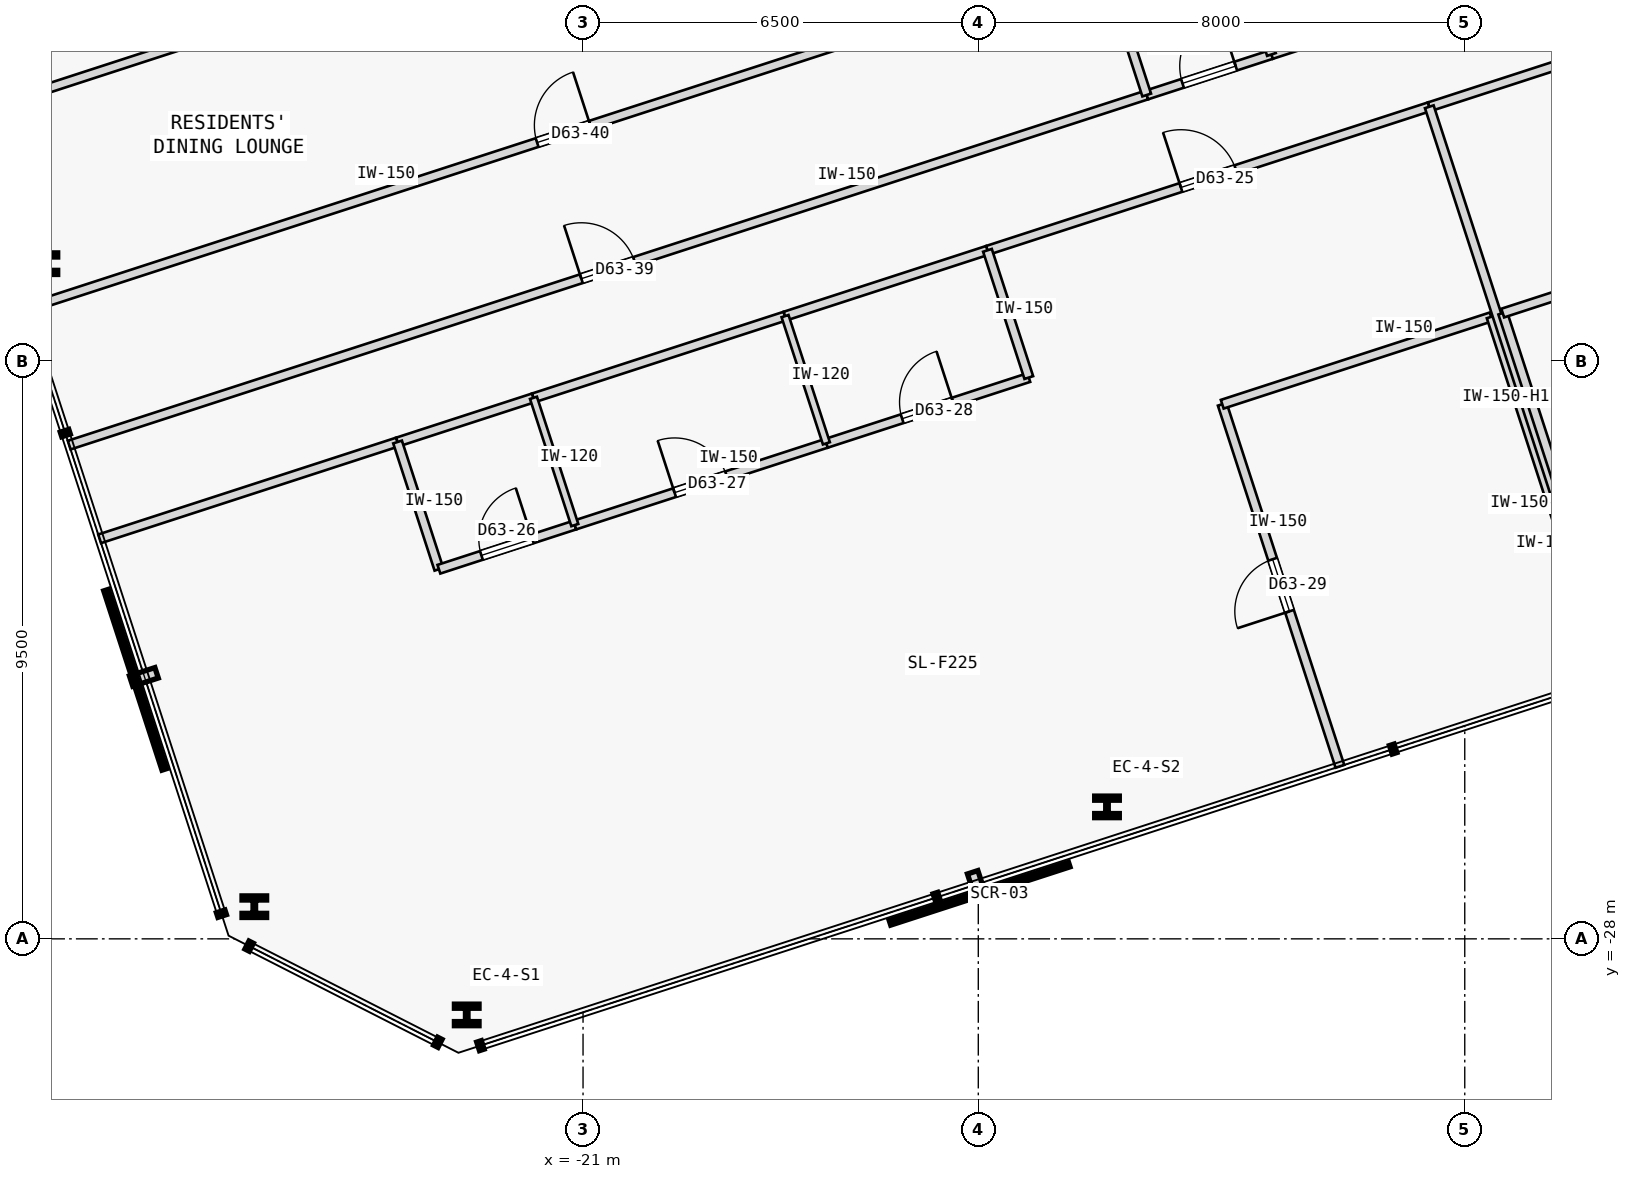
"""IFC4 building model, lengths in metres.
Left out: names, types, materials, properties, quantities, classifications, styles, units other than length and angle.
Written with IfcOpenShell. Run it as: python <this file> out.ifc"""

import sys

from ifc_helpers import new_model, si_unit, direction, frame, frame_2d, origin, origin_2d, place, context, subcontext, project, spatial, rectangle, i_section, extrude, element, fill, save


model = new_model("IFC4")
c1 = context("Model", 3, precision=1e-05, world=origin(), true_north=direction((0.0, 1.0)))
c2 = subcontext(c1, "Body", "Model", "MODEL_VIEW")
j1 = project(units=[si_unit("LENGTHUNIT", "METRE"), si_unit("PLANEANGLEUNIT", "RADIAN")], contexts=[c1])
p1 = place(None, origin())
s1 = spatial("IfcSite", under=j1, at=p1, CompositionType="ELEMENT")
p2 = place(p1, origin())
s2 = spatial("IfcBuilding", under=s1, at=p2, CompositionType="ELEMENT")
p3 = place(p2, frame((0.0, 0.0, 237.7)))
s3 = spatial("IfcBuildingStorey", under=s2, at=p3, CompositionType="ELEMENT", Elevation=237.7)
for number, where, z_axis, x_axis in (
    (1, (-22.913, -29.251, 0.0), (0.0, 0.0, 1.0), (1.0, 0.0, 0.0)),
    (2, (-12.384, -25.83, 0.0), (0.0, 0.0, 1.0), (1.0, 0.0, 0.0)),
    (3, (-29.842, -16.897, 0.0), (0.0, 0.0, 1.0), (1.0, 0.0, 0.0)),
    (4, (-26.406, -27.471, 0.0), (0.0, 0.0, 1.0), (1.0, 0.0, 0.0)),
):
    element("IfcColumn", number, at=place(p3, frame(where, z_axis=z_axis, x_axis=x_axis)), inside=s3, PredefinedType="COLUMN", context=c2, shape_type="SweptSolid", body=[
        extrude(i_section(OverallWidth=0.405, OverallDepth=0.355, WebThickness=0.042, FlangeThickness=0.068, FilletRadius=0.015, at=origin_2d()), origin(), (0.0, 0.0, 1.0), 3.35),
    ])
p4 = place(p3, frame((-28.95, -21.421, 0.0), z_axis=(0.0, 0.0, 1.0), x_axis=(0.951058442388, 0.309011066408, 0.0)))
e5 = element("IfcWall", 5, at=p4, inside=s3, PredefinedType="PARTITIONING", context=c2, shape_type="SweptSolid", body=[
    extrude(rectangle(XDim=5.152, YDim=0.15, at=frame_2d((2.576, 0.0))), origin(), (0.0, 0.0, 1.0), 3.125),
])
p5 = place(p3, frame((-14.349, -16.677, 0.0), z_axis=(0.0, 0.0, 1.0), x_axis=(0.951058958043, 0.309009479345, 0.0)))
e6 = element("IfcWall", 6, at=p5, inside=s3, PredefinedType="PARTITIONING", context=c2, shape_type="SweptSolid", body=[
    extrude(rectangle(XDim=7.64, YDim=0.15, at=frame_2d((3.82, 0.0))), origin(), (0.0, 0.0, 1.0), 3.125),
])
p6 = place(p5, frame((3.345, 0.0, 0.0)))
e7 = element("IfcOpeningElement", 7, at=p6, cuts=e6, PredefinedType="OPENING", context=c2, shape_type="SweptSolid", body=[
    extrude(rectangle(XDim=0.95, YDim=2.15, at=frame_2d((0.475, 1.075))), frame((0.0, 0.085, 0.0), z_axis=(0.0, -1.0, 0.0), x_axis=(1.0, 0.0, 0.0)), (0.0, 0.0, 1.0), 0.17),
])
p7 = place(p3, frame((-24.05, -19.829, 0.0), z_axis=(0.0, 0.0, 1.0), x_axis=(0.951035595692, 0.309081373955, 0.0)))
e8 = element("IfcWall", 8, at=p7, inside=s3, PredefinedType="PARTITIONING", context=c2, shape_type="SweptSolid", body=[
    extrude(rectangle(XDim=2.35, YDim=0.15, at=frame_2d((1.175, 0.0))), origin(), (0.0, 0.0, 1.0), 3.125),
])
p8 = place(p3, frame((-21.815, -19.103, 0.0), z_axis=(0.0, 0.0, 1.0), x_axis=(0.951057987102, 0.309012467661, 0.0)))
e9 = element("IfcWall", 9, at=p8, inside=s3, PredefinedType="PARTITIONING", context=c2, shape_type="SweptSolid", body=[
    extrude(rectangle(XDim=4.35, YDim=0.15, at=frame_2d((2.175, 0.0))), origin(), (0.0, 0.0, 1.0), 3.125),
])
p9 = place(p3, frame((-17.678, -17.759, 0.0), z_axis=(0.0, 0.0, 1.0), x_axis=(0.951055596592, 0.309019824916, 0.0)))
e10 = element("IfcWall", 10, at=p9, inside=s3, PredefinedType="PARTITIONING", context=c2, shape_type="SweptSolid", body=[
    extrude(rectangle(XDim=3.5, YDim=0.15, at=frame_2d((1.75, 0.0))), origin(), (0.0, 0.0, 1.0), 3.125),
])
p10 = place(p3, frame((-7.083, -14.316, 0.0), z_axis=(0.0, 0.0, 1.0), x_axis=(0.951054265246, 0.309023922305, 0.0)))
e11 = element("IfcWall", 11, at=p10, inside=s3, PredefinedType="PARTITIONING", context=c2, shape_type="SweptSolid", body=[
    extrude(rectangle(XDim=4.53, YDim=0.15, at=frame_2d((2.265, 0.0))), origin(), (0.0, 0.0, 1.0), 3.125),
])
p11 = place(p3, frame((-29.45, -19.881, 0.0), z_axis=(0.0, 0.0, 1.0), x_axis=(0.95105650271, 0.309017036186, 0.0)))
e12 = element("IfcWall", 12, at=p11, inside=s3, PredefinedType="PARTITIONING", context=c2, shape_type="SweptSolid", body=[
    extrude(rectangle(XDim=18.632, YDim=0.15, at=frame_2d((9.316, 0.0))), origin(), (0.0, 0.0, 1.0), 3.125),
])
p12 = place(p11, frame((8.856, 0.0, 0.0)))
e13 = element("IfcOpeningElement", 13, at=p12, cuts=e12, PredefinedType="OPENING", context=c2, shape_type="SweptSolid", body=[
    extrude(rectangle(XDim=0.92, YDim=2.15, at=frame_2d((0.46, 1.075))), frame((0.0, 0.085, 0.0), z_axis=(0.0, -1.0, 0.0), x_axis=(1.0, 0.0, 0.0)), (0.0, 0.0, 1.0), 0.17),
])
p13 = place(p3, frame((-11.73, -14.123, 0.0), z_axis=(0.0, 0.0, 1.0), x_axis=(0.951066501686, 0.308986260812, 0.0)))
e14 = element("IfcWall", 14, at=p13, inside=s3, PredefinedType="PARTITIONING", context=c2, shape_type="SweptSolid", body=[
    extrude(rectangle(XDim=2.157, YDim=0.15, at=frame_2d((1.079, 0.0))), origin(), (0.0, 0.0, 1.0), 3.125),
])
p14 = place(p13, frame((0.618, 0.0, 0.0)))
e15 = element("IfcOpeningElement", 15, at=p14, cuts=e14, PredefinedType="OPENING", context=c2, shape_type="SweptSolid", body=[
    extrude(rectangle(XDim=0.92, YDim=2.15, at=frame_2d((0.46, 1.075))), frame((0.0, 0.085, 0.0), z_axis=(0.0, -1.0, 0.0), x_axis=(1.0, 0.0, 0.0)), (0.0, 0.0, 1.0), 0.17),
])
p15 = place(p3, frame((-9.679, -13.457, 0.0), z_axis=(0.0, 0.0, 1.0), x_axis=(0.951054104561, 0.309024416831, 0.0)))
e16 = element("IfcWall", 16, at=p15, inside=s3, PredefinedType="PARTITIONING", context=c2, shape_type="SweptSolid", body=[
    extrude(rectangle(XDim=3.492, YDim=0.15, at=frame_2d((1.746, 0.0))), origin(), (0.0, 0.0, 1.0), 3.125),
])
p16 = place(p15, frame((1.286, 0.0, 0.0)))
e17 = element("IfcOpeningElement", 17, at=p16, cuts=e16, PredefinedType="OPENING", context=c2, shape_type="SweptSolid", body=[
    extrude(rectangle(XDim=0.92, YDim=2.15, at=frame_2d((0.46, 1.075))), frame((0.0, 0.085, 0.0), z_axis=(0.0, -1.0, 0.0), x_axis=(1.0, 0.0, 0.0)), (0.0, 0.0, 1.0), 0.17),
])
p17 = place(p3, frame((-23.37, -21.922, 0.0), z_axis=(0.0, 0.0, 1.0), x_axis=(-0.308960600764, 0.951074837842, 0.0)))
e18 = element("IfcWall", 18, at=p17, inside=s3, PredefinedType="PARTITIONING", context=c2, shape_type="SweptSolid", body=[
    extrude(rectangle(XDim=2.2, YDim=0.15, at=frame_2d((1.1, 0.0))), origin(), (0.0, 0.0, 1.0), 3.125),
])
p18 = place(p3, frame((-23.37, -21.922, 0.0), z_axis=(0.0, 0.0, 1.0), x_axis=(0.951045519245, 0.309050837767, 0.0)))
e19 = element("IfcWall", 19, at=p18, inside=s3, PredefinedType="PARTITIONING", context=c2, shape_type="SweptSolid", body=[
    extrude(rectangle(XDim=2.35, YDim=0.15, at=frame_2d((1.175, 0.0))), origin(), (0.0, 0.0, 1.0), 3.125),
])
p19 = place(p18, frame((0.735, 0.0, 0.0)))
e20 = element("IfcOpeningElement", 20, at=p19, cuts=e19, PredefinedType="OPENING", context=c2, shape_type="SweptSolid", body=[
    extrude(rectangle(XDim=0.88, YDim=2.15, at=frame_2d((0.44, 1.075))), frame((0.0, 0.085, 0.0), z_axis=(0.0, -1.0, 0.0), x_axis=(1.0, 0.0, 0.0)), (0.0, 0.0, 1.0), 0.17),
])
p20 = place(p3, frame((-21.135, -21.195, 0.0), z_axis=(0.0, 0.0, 1.0), x_axis=(0.951069122051, 0.308978195154, 0.0)))
e21 = element("IfcWall", 21, at=p20, inside=s3, PredefinedType="PARTITIONING", context=c2, shape_type="SweptSolid", body=[
    extrude(rectangle(XDim=4.35, YDim=0.15, at=frame_2d((2.175, 0.0))), origin(), (0.0, 0.0, 1.0), 3.125),
])
p21 = place(p20, frame((1.725, 0.0, 0.0)))
e22 = element("IfcOpeningElement", 22, at=p21, cuts=e21, PredefinedType="OPENING", context=c2, shape_type="SweptSolid", body=[
    extrude(rectangle(XDim=0.9, YDim=2.15, at=frame_2d((0.45, 1.075))), frame((0.0, 0.085, 0.0), z_axis=(0.0, -1.0, 0.0), x_axis=(1.0, 0.0, 0.0)), (0.0, 0.0, 1.0), 0.17),
])
p22 = place(p3, frame((-16.998, -19.851, 0.0), z_axis=(0.0, 0.0, 1.0), x_axis=(0.951041757107, 0.309062414796, 0.0)))
e23 = element("IfcWall", 23, at=p22, inside=s3, PredefinedType="PARTITIONING", context=c2, shape_type="SweptSolid", body=[
    extrude(rectangle(XDim=3.5, YDim=0.15, at=frame_2d((1.75, 0.0))), origin(), (0.0, 0.0, 1.0), 3.125),
])
p23 = place(p22, frame((1.31, 0.0, 0.0)))
e24 = element("IfcOpeningElement", 24, at=p23, cuts=e23, PredefinedType="OPENING", context=c2, shape_type="SweptSolid", body=[
    extrude(rectangle(XDim=0.88, YDim=2.15, at=frame_2d((0.44, 1.075))), frame((0.0, 0.085, 0.0), z_axis=(0.0, -1.0, 0.0), x_axis=(1.0, 0.0, 0.0)), (0.0, 0.0, 1.0), 0.17),
])
p24 = place(p3, frame((-13.669, -18.77, 0.0), z_axis=(0.0, 0.0, 1.0), x_axis=(-0.309060979314, 0.951042223598, 0.0)))
e25 = element("IfcWall", 25, at=p24, inside=s3, PredefinedType="PARTITIONING", context=c2, shape_type="SweptSolid", body=[
    extrude(rectangle(XDim=2.2, YDim=0.15, at=frame_2d((1.1, 0.0))), origin(), (0.0, 0.0, 1.0), 3.125),
])
p25 = place(p3, frame((-8.553, -25.164, 0.0), z_axis=(0.0, 0.0, 1.0), x_axis=(-0.309013782848, 0.951057559777, 0.0)))
e26 = element("IfcWall", 26, at=p25, inside=s3, PredefinedType="PARTITIONING", context=c2, shape_type="SweptSolid", body=[
    extrude(rectangle(XDim=6.262, YDim=0.15, at=frame_2d((3.131, 0.0))), origin(), (0.0, 0.0, 1.0), 3.125),
])
p26 = place(p25, frame((2.681, 0.0, 0.0)))
e27 = element("IfcOpeningElement", 27, at=p26, cuts=e26, PredefinedType="OPENING", context=c2, shape_type="SweptSolid", body=[
    extrude(rectangle(XDim=0.9, YDim=2.15, at=frame_2d((0.45, 1.075))), frame((0.0, 0.085, 0.0), z_axis=(0.0, -1.0, 0.0), x_axis=(1.0, 0.0, 0.0)), (0.0, 0.0, 1.0), 0.17),
])
p27 = place(p3, frame((-10.488, -19.208, 0.0), z_axis=(0.0, 0.0, 1.0), x_axis=(0.951050272606, 0.309036209813, 0.0)))
e28 = element("IfcWall", 28, at=p27, inside=s3, PredefinedType="PARTITIONING", context=c2, shape_type="SweptSolid", body=[
    extrude(rectangle(XDim=4.65, YDim=0.15, at=frame_2d((2.325, 0.0))), origin(), (0.0, 0.0, 1.0), 3.125),
])
p28 = place(p3, frame((-4.131, -23.727, 0.0), z_axis=(0.0, 0.0, 1.0), x_axis=(-0.309013782848, 0.951057559777, 0.0)))
e29 = element("IfcWall", 29, at=p28, inside=s3, PredefinedType="PARTITIONING", context=c2, shape_type="SweptSolid", body=[
    extrude(rectangle(XDim=6.262, YDim=0.15, at=frame_2d((3.131, 0.0))), origin(), (0.0, 0.0, 1.0), 2.675),
])
p29 = place(p3, frame((-4.036, -23.696, 0.0), z_axis=(0.0, 0.0, 1.0), x_axis=(-0.309022258842, 0.95105480575, 0.0)))
e30 = element("IfcWall", 30, at=p29, inside=s3, PredefinedType="PARTITIONING", context=c2, shape_type="SweptSolid", body=[
    extrude(rectangle(XDim=9.862, YDim=0.15, at=frame_2d((4.931, 0.0))), origin(), (0.0, 0.0, 1.0), 2.675),
])
p30 = place(p3, frame((-21.135, -21.195, 0.0), z_axis=(0.0, 0.0, 1.0), x_axis=(-0.309060979314, 0.951042223598, 0.0)))
e31 = element("IfcWall", 31, at=p30, inside=s3, PredefinedType="PARTITIONING", context=c2, shape_type="SweptSolid", body=[
    extrude(rectangle(XDim=2.2, YDim=0.12, at=frame_2d((1.1, 0.0))), origin(), (0.0, 0.0, 1.0), 3.125),
])
p31 = place(p3, frame((-16.998, -19.851, 0.0), z_axis=(0.0, 0.0, 1.0), x_axis=(-0.30892799396, 0.951085429679, 0.0)))
e32 = element("IfcWall", 32, at=p31, inside=s3, PredefinedType="PARTITIONING", context=c2, shape_type="SweptSolid", body=[
    extrude(rectangle(XDim=2.2, YDim=0.12, at=frame_2d((1.1, 0.0))), origin(), (0.0, 0.0, 1.0), 3.125),
])
p32 = place(p3, frame((-3.941, -23.665, 0.0), z_axis=(0.0, 0.0, 1.0), x_axis=(-0.309013782848, 0.951057559777, 0.0)))
e33 = element("IfcWall", 33, at=p32, inside=s3, PredefinedType="PARTITIONING", context=c2, shape_type="SweptSolid", body=[
    extrude(rectangle(XDim=6.262, YDim=0.15, at=frame_2d((3.131, 0.0))), origin(), (0.0, 0.0, 1.0), 2.675),
])
p33 = place(p3, frame((-5.876, -17.709, 0.0), z_axis=(0.0, 0.0, 1.0), x_axis=(0.951065702951, 0.308988719326, 0.0)))
e34 = element("IfcWall", 34, at=p33, inside=s3, PredefinedType="PARTITIONING", context=c2, shape_type="SweptSolid", body=[
    extrude(rectangle(XDim=4.65, YDim=0.15, at=frame_2d((2.325, 0.0))), origin(), (0.0, 0.0, 1.0), 3.125),
])
p34 = place(p3, frame((-30.178, -17.642, 0.0), z_axis=(0.0, 0.0, 1.0), x_axis=(0.95105650271, 0.309017036186, 0.0)))
e35 = element("IfcWall", 35, at=p34, inside=s3, PredefinedType="PARTITIONING", context=c2, shape_type="SweptSolid", body=[
    extrude(rectangle(XDim=18.632, YDim=0.15, at=frame_2d((9.316, 0.0))), origin(), (0.0, 0.0, 1.0), 3.125),
])
p35 = place(p34, frame((8.856, 0.0, 0.0)))
e36 = element("IfcOpeningElement", 36, at=p35, cuts=e35, PredefinedType="OPENING", context=c2, shape_type="SweptSolid", body=[
    extrude(rectangle(XDim=0.92, YDim=2.15, at=frame_2d((0.46, 1.075))), frame((0.0, 0.085, 0.0), z_axis=(0.0, -1.0, 0.0), x_axis=(1.0, 0.0, 0.0)), (0.0, 0.0, 1.0), 0.17),
])
p36 = place(p3, frame((-11.73, -14.123, 0.0), z_axis=(0.0, 0.0, 1.0), x_axis=(-0.309062621189, 0.951041690035, 0.0)))
e37 = element("IfcWall", 37, at=p36, inside=s3, PredefinedType="PARTITIONING", context=c2, shape_type="SweptSolid", body=[
    extrude(rectangle(XDim=2.354, YDim=0.15, at=frame_2d((1.177, 0.0))), origin(), (0.0, 0.0, 1.0), 3.125),
])
p37 = place(p3, frame((-31.208, -14.471, 0.0), z_axis=(0.0, 0.0, 1.0), x_axis=(0.951057753948, 0.309013185244, 0.0)))
e38 = element("IfcWall", 38, at=p37, inside=s3, PredefinedType="PARTITIONING", context=c2, shape_type="SweptSolid", body=[
    extrude(rectangle(XDim=18.632, YDim=0.15, at=frame_2d((9.316, 0.0))), origin(), (0.0, 0.0, 1.0), 3.125),
])
p38 = place(p3, frame((-9.679, -13.457, 0.0), z_axis=(0.0, 0.0, 1.0), x_axis=(-0.309010558951, 0.951058607267, 0.0)))
e39 = element("IfcWall", 39, at=p38, inside=s3, PredefinedType="PARTITIONING", context=c2, shape_type="SweptSolid", body=[
    extrude(rectangle(XDim=8.261, YDim=0.15, at=frame_2d((4.13, 0.0))), origin(), (0.0, 0.0, 1.0), 3.125),
])
p39 = place(p6, origin())
e40 = element("IfcDoor", 40, at=p39, inside=s3, OperationType="SINGLE_SWING_LEFT", PredefinedType="DOOR", context=c2, shape_type="SweptSolid", body=[
    extrude(rectangle(XDim=0.95, YDim=2.15, at=frame_2d((0.475, 1.075))), frame((0.0, 0.025, 0.0), z_axis=(0.0, -1.0, 0.0), x_axis=(1.0, 0.0, 0.0)), (0.0, 0.0, 1.0), 0.05),
])
fill(e7, e40)
p40 = place(p19, origin())
e41 = element("IfcDoor", 41, at=p40, inside=s3, OperationType="SINGLE_SWING_RIGHT", PredefinedType="DOOR", context=c2, shape_type="SweptSolid", body=[
    extrude(rectangle(XDim=0.88, YDim=2.15, at=frame_2d((0.44, 1.075))), frame((0.0, 0.025, 0.0), z_axis=(0.0, -1.0, 0.0), x_axis=(1.0, 0.0, 0.0)), (0.0, 0.0, 1.0), 0.05),
])
fill(e20, e41)
p41 = place(p21, origin())
e42 = element("IfcDoor", 42, at=p41, inside=s3, OperationType="SINGLE_SWING_LEFT", PredefinedType="DOOR", context=c2, shape_type="SweptSolid", body=[
    extrude(rectangle(XDim=0.9, YDim=2.15, at=frame_2d((0.45, 1.075))), frame((0.0, 0.025, 0.0), z_axis=(0.0, -1.0, 0.0), x_axis=(1.0, 0.0, 0.0)), (0.0, 0.0, 1.0), 0.05),
])
fill(e22, e42)
p42 = place(p23, origin())
e43 = element("IfcDoor", 43, at=p42, inside=s3, OperationType="SINGLE_SWING_RIGHT", PredefinedType="DOOR", context=c2, shape_type="SweptSolid", body=[
    extrude(rectangle(XDim=0.88, YDim=2.15, at=frame_2d((0.44, 1.075))), frame((0.0, 0.025, 0.0), z_axis=(0.0, -1.0, 0.0), x_axis=(1.0, 0.0, 0.0)), (0.0, 0.0, 1.0), 0.05),
])
fill(e24, e43)
p43 = place(p26, origin())
e44 = element("IfcDoor", 44, at=p43, inside=s3, OperationType="SINGLE_SWING_LEFT", PredefinedType="DOOR", context=c2, shape_type="SweptSolid", body=[
    extrude(rectangle(XDim=0.9, YDim=2.15, at=frame_2d((0.45, 1.075))), frame((0.0, 0.025, 0.0), z_axis=(0.0, -1.0, 0.0), x_axis=(1.0, 0.0, 0.0)), (0.0, 0.0, 1.0), 0.05),
])
fill(e27, e44)
p44 = place(p12, origin())
e45 = element("IfcDoor", 45, at=p44, inside=s3, OperationType="SINGLE_SWING_LEFT", PredefinedType="DOOR", context=c2, shape_type="SweptSolid", body=[
    extrude(rectangle(XDim=0.92, YDim=2.15, at=frame_2d((0.46, 1.075))), frame((0.0, 0.025, 0.0), z_axis=(0.0, -1.0, 0.0), x_axis=(1.0, 0.0, 0.0)), (0.0, 0.0, 1.0), 0.05),
])
fill(e13, e45)
p45 = place(p35, origin())
e46 = element("IfcDoor", 46, at=p45, inside=s3, OperationType="SINGLE_SWING_RIGHT", PredefinedType="DOOR", context=c2, shape_type="SweptSolid", body=[
    extrude(rectangle(XDim=0.92, YDim=2.15, at=frame_2d((0.46, 1.075))), frame((0.0, 0.025, 0.0), z_axis=(0.0, -1.0, 0.0), x_axis=(1.0, 0.0, 0.0)), (0.0, 0.0, 1.0), 0.05),
])
fill(e36, e46)
p46 = place(p14, origin())
e47 = element("IfcDoor", 47, at=p46, inside=s3, OperationType="SINGLE_SWING_RIGHT", PredefinedType="DOOR", context=c2, shape_type="SweptSolid", body=[
    extrude(rectangle(XDim=0.92, YDim=2.15, at=frame_2d((0.46, 1.075))), frame((0.0, 0.025, 0.0), z_axis=(0.0, -1.0, 0.0), x_axis=(1.0, 0.0, 0.0)), (0.0, 0.0, 1.0), 0.05),
])
fill(e15, e47)
save(model, sys.argv[1])
